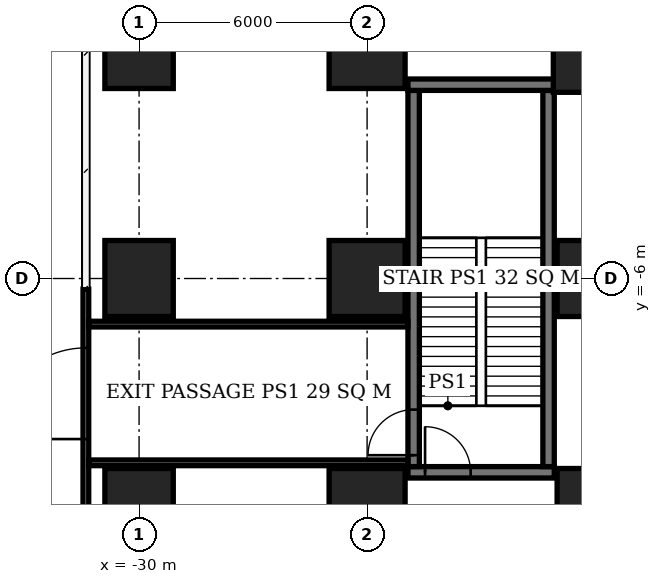
"""IFC4 building model, lengths in metres.
Left out: names, types, materials, properties, quantities, classifications, styles, units other than length and angle.
Written with IfcOpenShell. Run it as: python <this file> out.ifc"""

import sys

from ifc_helpers import new_model, si_unit, direction, frame, frame_2d, origin, origin_2d, place, context, subcontext, project, spatial, rectangle, extrude, element, fill, save


model = new_model("IFC4")
c1 = context("Model", 3, precision=1e-05, world=origin(), true_north=direction((0.0, 1.0)))
c2 = subcontext(c1, "Body", "Model", "MODEL_VIEW")
j1 = project(units=[si_unit("LENGTHUNIT", "METRE"), si_unit("PLANEANGLEUNIT", "RADIAN")], contexts=[c1])
p1 = place(None, origin())
s1 = spatial("IfcSite", under=j1, at=p1, CompositionType="ELEMENT")
p2 = place(p1, origin())
s2 = spatial("IfcBuilding", under=s1, at=p2, CompositionType="ELEMENT")
p3 = place(p2, origin())
s3 = spatial("IfcBuildingStorey", under=s2, at=p3, CompositionType="ELEMENT", Elevation=0.0)
for number, where, z_axis, x_axis in (
    (1, (-30.0, -12.0, -0.45), (0.0, 0.0, 1.0), (0.0, 1.0, 0.0)),
    (2, (-30.0, -6.0, -0.45), (0.0, 0.0, 1.0), (0.0, 1.0, 0.0)),
    (3, (-30.0, 0.0, -0.45), (0.0, 0.0, 1.0), (0.0, 1.0, 0.0)),
):
    element("IfcColumn", number, at=place(p3, frame(where, z_axis=z_axis, x_axis=x_axis)), inside=s3, PredefinedType="COLUMN", context=c2, shape_type="SweptSolid", body=[
        extrude(rectangle(XDim=2.0, YDim=1.8, at=origin_2d()), origin(), (0.0, 0.0, 1.0), 6.45),
    ])
for number, where, z_axis, x_axis in (
    (4, (-24.0, -12.0, -0.45), (0.0, 0.0, 1.0), (1.0, 0.0, 0.0)),
    (5, (-24.0, -6.0, -0.45), (0.0, 0.0, 1.0), (1.0, 0.0, 0.0)),
    (6, (-24.0, 0.0, -0.45), (0.0, 0.0, 1.0), (1.0, 0.0, 0.0)),
):
    element("IfcColumn", number, at=place(p3, frame(where, z_axis=z_axis, x_axis=x_axis)), inside=s3, PredefinedType="COLUMN", context=c2, shape_type="SweptSolid", body=[
        extrude(rectangle(XDim=2.0, YDim=2.0, at=origin_2d()), origin(), (0.0, 0.0, 1.0), 6.45),
    ])
for number, where, z_axis, x_axis in (
    (7, (-18.0, -12.0, 0.0), (0.0, 0.0, 1.0), (1.0, 0.0, 0.0)),
    (8, (-18.0, -6.0, 0.0), (0.0, 0.0, 1.0), (1.0, 0.0, 0.0)),
):
    element("IfcColumn", number, at=place(p3, frame(where, z_axis=z_axis, x_axis=x_axis)), inside=s3, PredefinedType="COLUMN", context=c2, shape_type="SweptSolid", body=[
        extrude(rectangle(XDim=2.0, YDim=2.0, at=origin_2d()), origin(), (0.0, 0.0, 1.0), 6.0),
    ])
p4 = place(p3, frame((-18.0, 0.0, 0.0), z_axis=(0.0, 0.0, 1.0), x_axis=(1.0, 0.0, 0.0)))
e9 = element("IfcColumn", 9, at=p4, inside=s3, PredefinedType="COLUMN", context=c2, shape_type="SweptSolid", body=[
    extrude(rectangle(XDim=2.2, YDim=2.2, at=origin_2d()), origin(), (0.0, 0.0, 1.0), 6.0),
])
p5 = place(p3, frame((-31.4, -12.382, 0.0), z_axis=(0.0, 0.0, 1.0), x_axis=(0.0, 1.0, 0.0)))
e10 = element("IfcWall", 10, at=p5, inside=s3, PredefinedType="USERDEFINED", context=c2, shape_type="SweptSolid", body=[
    extrude(rectangle(XDim=6.101, YDim=0.15, at=frame_2d((3.05, 0.0))), origin(), (0.0, 0.0, 1.0), 6.0),
])
p6 = place(p5, frame((2.157, 0.0, 0.0)))
e11 = element("IfcOpeningElement", 11, at=p6, cuts=e10, PredefinedType="OPENING", context=c2, shape_type="SweptSolid", body=[
    extrude(rectangle(XDim=2.4, YDim=2.7, at=frame_2d((1.2, 1.35))), frame((0.0, 0.085, 0.0), z_axis=(0.0, -1.0, 0.0), x_axis=(1.0, 0.0, 0.0)), (0.0, 0.0, 1.0), 0.17),
])
p7 = place(p3, frame((-22.925, -11.1, 0.0), z_axis=(0.0, 0.0, 1.0), x_axis=(1.0, 0.0, 0.0)))
e12 = element("IfcWall", 12, at=p7, inside=s3, PredefinedType="SOLIDWALL", context=c2, shape_type="SweptSolid", body=[
    extrude(rectangle(XDim=3.85, YDim=0.3, at=frame_2d((1.925, 0.0))), origin(), (0.0, 0.0, 1.0), 5.75),
])
p8 = place(p7, frame((0.45, 0.0, 0.0)))
e13 = element("IfcOpeningElement", 13, at=p8, cuts=e12, PredefinedType="OPENING", context=c2, shape_type="SweptSolid", body=[
    extrude(rectangle(XDim=1.2, YDim=2.1, at=frame_2d((0.6, 1.05))), frame((0.0, 0.16, 0.0), z_axis=(0.0, -1.0, 0.0), x_axis=(1.0, 0.0, 0.0)), (0.0, 0.0, 1.0), 0.32),
])
p9 = place(p3, frame((-22.925, -0.9, 0.0), z_axis=(0.0, 0.0, 1.0), x_axis=(1.0, 0.0, 0.0)))
e14 = element("IfcWall", 14, at=p9, inside=s3, PredefinedType="SOLIDWALL", context=c2, shape_type="SweptSolid", body=[
    extrude(rectangle(XDim=3.85, YDim=0.3, at=frame_2d((1.925, 0.0))), origin(), (0.0, 0.0, 1.0), 5.75),
])
p10 = place(p3, frame((-22.775, -10.95, 0.0), z_axis=(0.0, 0.0, 1.0), x_axis=(0.0, 1.0, 0.0)))
e15 = element("IfcWall", 15, at=p10, inside=s3, PredefinedType="SOLIDWALL", context=c2, shape_type="SweptSolid", body=[
    extrude(rectangle(XDim=9.9, YDim=0.3, at=frame_2d((4.95, 0.0))), origin(), (0.0, 0.0, 1.0), 5.75),
])
p11 = place(p10, frame((0.3, 0.0, 0.0)))
e16 = element("IfcOpeningElement", 16, at=p11, cuts=e15, PredefinedType="OPENING", context=c2, shape_type="SweptSolid", body=[
    extrude(rectangle(XDim=1.2, YDim=2.1, at=frame_2d((0.6, 1.05))), frame((0.0, 0.16, 0.0), z_axis=(0.0, -1.0, 0.0), x_axis=(1.0, 0.0, 0.0)), (0.0, 0.0, 1.0), 0.32),
])
p12 = place(p3, frame((-19.225, -10.95, 0.0), z_axis=(0.0, 0.0, 1.0), x_axis=(0.0, 1.0, 0.0)))
e17 = element("IfcWall", 17, at=p12, inside=s3, PredefinedType="SOLIDWALL", context=c2, shape_type="SweptSolid", body=[
    extrude(rectangle(XDim=9.9, YDim=0.3, at=frame_2d((4.95, 0.0))), origin(), (0.0, 0.0, 1.0), 5.75),
])
for number, where, z_axis, x_axis in (
    (18, (-31.325, -10.85, 0.0), (0.0, 0.0, 1.0), (1.0, 0.0, 0.0)),
    (19, (-31.325, -7.2, 0.0), (0.0, 0.0, 1.0), (1.0, 0.0, 0.0)),
):
    element("IfcWall", number, at=place(p3, frame(where, z_axis=z_axis, x_axis=x_axis)), inside=s3, PredefinedType="PARTITIONING", context=c2, shape_type="SweptSolid", body=[
        extrude(rectangle(XDim=8.4, YDim=0.15, at=frame_2d((4.2, 0.0))), origin(), (0.0, 0.0, 1.0), 5.75),
    ])
p13 = place(p8, origin())
e20 = element("IfcDoor", 20, at=p13, inside=s3, OperationType="SINGLE_SWING_LEFT", PredefinedType="DOOR", context=c2, shape_type="SweptSolid", body=[
    extrude(rectangle(XDim=1.2, YDim=2.1, at=frame_2d((0.6, 1.05))), frame((0.0, 0.025, 0.0), z_axis=(0.0, -1.0, 0.0), x_axis=(1.0, 0.0, 0.0)), (0.0, 0.0, 1.0), 0.05),
])
fill(e13, e20)
p14 = place(p11, origin())
e21 = element("IfcDoor", 21, at=p14, inside=s3, OperationType="SINGLE_SWING_LEFT", PredefinedType="DOOR", context=c2, shape_type="SweptSolid", body=[
    extrude(rectangle(XDim=1.2, YDim=2.1, at=frame_2d((0.6, 1.05))), frame((0.0, 0.025, 0.0), z_axis=(0.0, -1.0, 0.0), x_axis=(1.0, 0.0, 0.0)), (0.0, 0.0, 1.0), 0.05),
])
fill(e16, e21)
p15 = place(p6, origin())
e22 = element("IfcDoor", 22, at=p15, inside=s3, OperationType="DOUBLE_DOOR_SINGLE_SWING", PredefinedType="DOOR", context=c2, shape_type="SweptSolid", body=[
    extrude(rectangle(XDim=2.4, YDim=2.7, at=frame_2d((1.2, 1.35))), frame((0.0, 0.025, 0.0), z_axis=(0.0, -1.0, 0.0), x_axis=(1.0, 0.0, 0.0)), (0.0, 0.0, 1.0), 0.05),
])
fill(e11, e22)
save(model, sys.argv[1])
